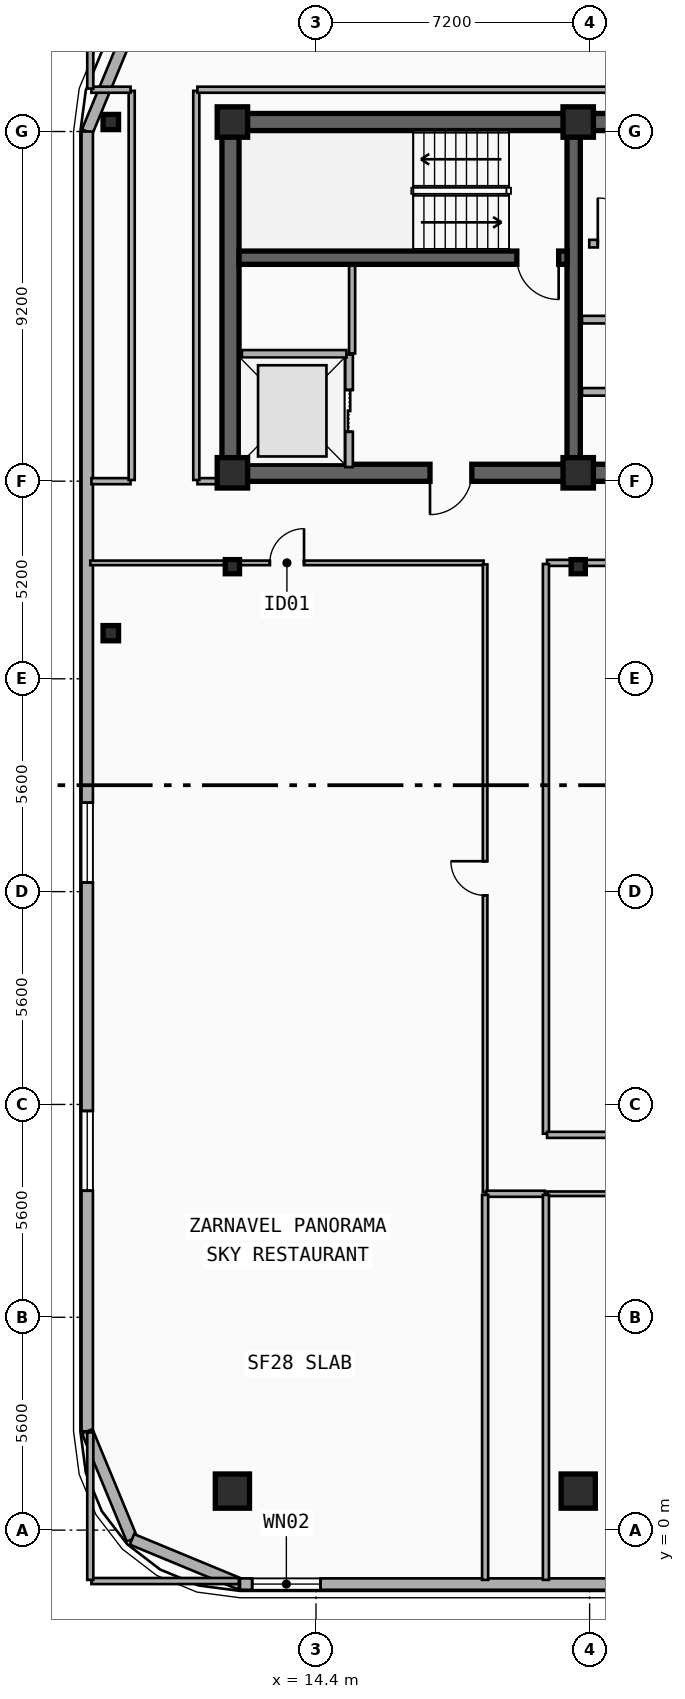
"""IFC4 building model, lengths in metres.
Left out: names, types, materials, properties, quantities, classifications, styles, units other than length and angle.
Written with IfcOpenShell. Run it as: python <this file> out.ifc"""

import sys

from ifc_helpers import new_model, si_unit, direction, frame, frame_2d, origin, origin_2d, place, context, subcontext, project, spatial, rectangle, i_section, extrude, element, fill, save


model = new_model("IFC4")
c1 = context("Model", 3, precision=1e-05, world=origin(), true_north=direction((0.0, 1.0)))
c2 = subcontext(c1, "Body", "Model", "MODEL_VIEW")
j1 = project(units=[si_unit("LENGTHUNIT", "METRE"), si_unit("PLANEANGLEUNIT", "RADIAN")], contexts=[c1])
p1 = place(None, origin())
s1 = spatial("IfcSite", under=j1, at=p1, CompositionType="ELEMENT")
p2 = place(p1, origin())
s2 = spatial("IfcBuilding", under=s1, at=p2, CompositionType="ELEMENT")
p3 = place(p2, frame((0.0, 0.0, 276.9)))
s3 = spatial("IfcBuildingStorey", under=s2, at=p3, CompositionType="ELEMENT", Elevation=276.9)
p4 = place(p3, frame((12.15, 37.05, 0.0), z_axis=(0.0, 0.0, 1.0), x_axis=(1.0, 0.0, 0.0)))
e1 = element("IfcWall", 1, at=p4, inside=s3, PredefinedType="SHEAR", context=c2, shape_type="SweptSolid", body=[
    extrude(rectangle(XDim=33.23, YDim=0.45, at=frame_2d((16.615, 0.0))), origin(), (0.0, 0.0, 1.0), 3.7),
])
p5 = place(p3, frame((21.18, 27.82, 0.0), z_axis=(0.0, 0.0, 1.0), x_axis=(-1.0, 0.0, 0.0)))
e2 = element("IfcWall", 2, at=p5, inside=s3, PredefinedType="SHEAR", context=c2, shape_type="SweptSolid", body=[
    extrude(rectangle(XDim=9.03, YDim=0.45, at=frame_2d((4.515, 0.0))), origin(), (0.0, 0.0, 1.0), 3.7),
])
p6 = place(p5, frame((2.68, 0.0, 0.0)))
e3 = element("IfcOpeningElement", 3, at=p6, cuts=e2, PredefinedType="OPENING", context=c2, shape_type="SweptSolid", body=[
    extrude(rectangle(XDim=1.1, YDim=2.15, at=frame_2d((0.55, 1.075))), frame((0.0, 0.235, 0.0), z_axis=(0.0, -1.0, 0.0), x_axis=(1.0, 0.0, 0.0)), (0.0, 0.0, 1.0), 0.47),
])
p7 = place(p3, frame((33.15, 27.82, 0.0), z_axis=(0.0, 0.0, 1.0), x_axis=(-1.0, 0.0, 0.0)))
e4 = element("IfcWall", 4, at=p7, inside=s3, PredefinedType="SHEAR", context=c2, shape_type="SweptSolid", body=[
    extrude(rectangle(XDim=11.97, YDim=0.45, at=frame_2d((5.985, 0.0))), origin(), (0.0, 0.0, 1.0), 3.7),
])
p8 = place(p7, frame((6.1, 0.0, 0.0)))
e5 = element("IfcOpeningElement", 5, at=p8, cuts=e4, PredefinedType="OPENING", context=c2, shape_type="SweptSolid", body=[
    extrude(rectangle(XDim=1.6, YDim=2.2, at=frame_2d((0.8, 1.1))), frame((0.0, 0.235, 0.0), z_axis=(0.0, -1.0, 0.0), x_axis=(1.0, 0.0, 0.0)), (0.0, 0.0, 1.0), 0.47),
])
p9 = place(p3, frame((12.15, 28.045, 0.0), z_axis=(0.0, 0.0, 1.0), x_axis=(0.0, 1.0, 0.0)))
e6 = element("IfcWall", 6, at=p9, inside=s3, PredefinedType="SHEAR", context=c2, shape_type="SweptSolid", body=[
    extrude(rectangle(XDim=8.78, YDim=0.45, at=frame_2d((4.39, 0.0))), origin(), (0.0, 0.0, 1.0), 3.7),
])
p10 = place(p3, frame((21.18, 28.045, 0.0), z_axis=(0.0, 0.0, 1.0), x_axis=(0.0, 1.0, 0.0)))
e7 = element("IfcWall", 7, at=p10, inside=s3, PredefinedType="SHEAR", context=c2, shape_type="SweptSolid", body=[
    extrude(rectangle(XDim=8.78, YDim=0.35, at=frame_2d((4.39, 0.0))), origin(), (0.0, 0.0, 1.0), 3.7),
])
p11 = place(p3, frame((21.005, 33.48, 0.0), z_axis=(0.0, 0.0, 1.0), x_axis=(-1.0, 0.0, 0.0)))
e8 = element("IfcWall", 8, at=p11, inside=s3, PredefinedType="SHEAR", context=c2, shape_type="SweptSolid", body=[
    extrude(rectangle(XDim=8.63, YDim=0.35, at=frame_2d((4.315, 0.0))), origin(), (0.0, 0.0, 1.0), 3.7),
])
p12 = place(p11, frame((0.22, 0.0, 0.0)))
e9 = element("IfcOpeningElement", 9, at=p12, cuts=e8, PredefinedType="OPENING", context=c2, shape_type="SweptSolid", body=[
    extrude(rectangle(XDim=1.1, YDim=2.15, at=frame_2d((0.55, 1.075))), frame((0.0, 0.185, 0.0), z_axis=(0.0, -1.0, 0.0), x_axis=(1.0, 0.0, 0.0)), (0.0, 0.0, 1.0), 0.37),
])
for number, where, z_axis, x_axis in (
    (10, (12.2, 27.82, 0.0), (0.0, 0.0, 1.0), (1.0, 0.0, 0.0)),
    (11, (12.2, 37.05, 0.0), (0.0, 0.0, 1.0), (1.0, 0.0, 0.0)),
    (12, (21.3, 27.82, 0.0), (0.0, 0.0, 1.0), (1.0, 0.0, 0.0)),
    (13, (21.3, 37.05, 0.0), (0.0, 0.0, 1.0), (1.0, 0.0, 0.0)),
):
    element("IfcColumn", number, at=place(p3, frame(where, z_axis=z_axis, x_axis=x_axis)), inside=s3, PredefinedType="COLUMN", context=c2, shape_type="SweptSolid", body=[
        extrude(rectangle(XDim=0.8, YDim=0.8, at=origin_2d()), origin(), (0.0, 0.0, 1.0), 3.7),
    ])
for number, where, z_axis, x_axis in (
    (14, (12.2, 25.35, 0.0), (0.0, 0.0, 1.0), (1.0, 0.0, 0.0)),
    (15, (21.3, 25.35, 0.0), (0.0, 0.0, 1.0), (1.0, 0.0, 0.0)),
):
    element("IfcColumn", number, at=place(p3, frame(where, z_axis=z_axis, x_axis=x_axis)), inside=s3, PredefinedType="COLUMN", context=c2, shape_type="SweptSolid", body=[
        extrude(i_section(OverallWidth=0.374, OverallDepth=0.372, WebThickness=0.017, FlangeThickness=0.027, FilletRadius=0.015, at=origin_2d()), origin(), (0.0, 0.0, 1.0), 3.7),
    ])
for number, where, z_axis, x_axis in (
    (16, (12.2, 1.135, 0.0), (0.0, -0.09, 0.996), (1.0, 0.0, 0.0)),
    (17, (21.3, 1.135, 0.0), (0.0, -0.09, 0.996), (1.0, 0.0, 0.0)),
):
    element("IfcColumn", number, at=place(p3, frame(where, z_axis=z_axis, x_axis=x_axis)), inside=s3, PredefinedType="COLUMN", context=c2, shape_type="SweptSolid", body=[
        extrude(rectangle(XDim=0.9, YDim=0.9, at=origin_2d()), origin(), (0.0, 0.0, 1.0), 3.715),
    ])
for number, where, z_axis, x_axis in (
    (18, (9.0, 23.6, 0.0), (0.0, 0.0, 1.0), (1.0, 0.0, 0.0)),
    (19, (9.0, 37.05, 0.0), (0.0, 0.0, 1.0), (1.0, 0.0, 0.0)),
):
    element("IfcColumn", number, at=place(p3, frame(where, z_axis=z_axis, x_axis=x_axis)), inside=s3, PredefinedType="COLUMN", context=c2, shape_type="SweptSolid", body=[
        extrude(i_section(OverallWidth=0.408, OverallDepth=0.4, WebThickness=0.025, FlangeThickness=0.039, FilletRadius=0.015, at=origin_2d()), origin(), (0.0, 0.0, 1.0), 3.7),
    ])
p13 = place(p3, frame((8.38, 36.8, 0.0), z_axis=(0.0, 0.0, 1.0), x_axis=(0.382704529509, 0.923870793506, 0.0)))
e20 = element("IfcWall", 20, at=p13, inside=s3, PredefinedType="SOLIDWALL", context=c2, shape_type="SweptSolid", body=[
    extrude(rectangle(XDim=3.077, YDim=0.3, at=frame_2d((1.538, 0.0))), origin(), (0.0, 0.0, 1.0), 3.38),
])
p14 = place(p3, frame((8.38, 2.6, 0.0), z_axis=(0.0, 0.0, 1.0), x_axis=(0.0, 1.0, 0.0)))
e21 = element("IfcWall", 21, at=p14, inside=s3, PredefinedType="SOLIDWALL", context=c2, shape_type="SweptSolid", body=[
    extrude(rectangle(XDim=34.2, YDim=0.3, at=frame_2d((17.1, 0.0))), origin(), (0.0, 0.0, 1.0), 3.38),
])
p15 = place(p14, frame((6.33, 0.0, 0.75)))
e22 = element("IfcOpeningElement", 22, at=p15, cuts=e21, PredefinedType="OPENING", context=c2, shape_type="SweptSolid", body=[
    extrude(rectangle(XDim=2.1, YDim=2.1, at=frame_2d((1.05, 1.05))), frame((0.0, 0.16, 0.0), z_axis=(0.0, -1.0, 0.0), x_axis=(1.0, 0.0, 0.0)), (0.0, 0.0, 1.0), 0.32),
])
p16 = place(p14, frame((14.44, 0.0, 0.75)))
e23 = element("IfcOpeningElement", 23, at=p16, cuts=e21, PredefinedType="OPENING", context=c2, shape_type="SweptSolid", body=[
    extrude(rectangle(XDim=2.1, YDim=2.1, at=frame_2d((1.05, 1.05))), frame((0.0, 0.16, 0.0), z_axis=(0.0, -1.0, 0.0), x_axis=(1.0, 0.0, 0.0)), (0.0, 0.0, 1.0), 0.32),
])
p17 = place(p3, frame((9.557, -0.243, 0.0), z_axis=(0.0, 0.0, 1.0), x_axis=(-0.382676475685, 0.923882414032, 0.0)))
e24 = element("IfcWall", 24, at=p17, inside=s3, PredefinedType="SOLIDWALL", context=c2, shape_type="SweptSolid", body=[
    extrude(rectangle(XDim=3.077, YDim=0.3, at=frame_2d((1.539, 0.0))), origin(), (0.0, 0.0, 1.0), 3.38),
])
p18 = place(p3, frame((12.4, -1.42, 0.0), z_axis=(0.0, 0.0, 1.0), x_axis=(-0.92389884758, 0.382636798336, 0.0)))
e25 = element("IfcWall", 25, at=p18, inside=s3, PredefinedType="SOLIDWALL", context=c2, shape_type="SweptSolid", body=[
    extrude(rectangle(XDim=3.077, YDim=0.3, at=frame_2d((1.538, 0.0))), origin(), (0.0, 0.0, 1.0), 3.38),
])
p19 = place(p3, frame((45.2, -1.42, 0.0), z_axis=(0.0, 0.0, 1.0), x_axis=(-1.0, 0.0, 0.0)))
e26 = element("IfcWall", 26, at=p19, inside=s3, PredefinedType="SOLIDWALL", context=c2, shape_type="SweptSolid", body=[
    extrude(rectangle(XDim=32.8, YDim=0.3, at=frame_2d((16.4, 0.0))), origin(), (0.0, 0.0, 1.0), 3.38),
])
p20 = place(p19, frame((30.68, 0.0, 0.34)))
e27 = element("IfcOpeningElement", 27, at=p20, cuts=e26, PredefinedType="OPENING", context=c2, shape_type="SweptSolid", body=[
    extrude(rectangle(XDim=1.8, YDim=1.8, at=frame_2d((0.9, 0.9))), frame((0.0, 0.16, 0.0), z_axis=(0.0, -1.0, 0.0), x_axis=(1.0, 0.0, 0.0)), (0.0, 0.0, 1.0), 0.32),
])
p21 = place(p19, frame((10.206, 0.0, 0.75)))
e28 = element("IfcOpeningElement", 28, at=p21, cuts=e26, PredefinedType="OPENING", context=c2, shape_type="SweptSolid", body=[
    extrude(rectangle(XDim=2.1, YDim=2.1, at=frame_2d((1.05, 1.05))), frame((0.0, 0.16, 0.0), z_axis=(0.0, -1.0, 0.0), x_axis=(1.0, 0.0, 0.0)), (0.0, 0.0, 1.0), 0.32),
])
p22 = place(p3, frame((15.27, 27.97, 0.0), z_axis=(0.0, 0.0, 1.0), x_axis=(0.0, 1.0, 0.0)))
e29 = element("IfcWall", 29, at=p22, inside=s3, PredefinedType="PARTITIONING", context=c2, shape_type="SweptSolid", body=[
    extrude(rectangle(XDim=2.96, YDim=0.2, at=frame_2d((1.48, 0.0))), origin(), (0.0, 0.0, 1.0), 2.45),
])
p23 = place(p22, frame((0.93, 0.0, 0.0)))
e30 = element("IfcOpeningElement", 30, at=p23, cuts=e29, PredefinedType="OPENING", context=c2, shape_type="SweptSolid", body=[
    extrude(rectangle(XDim=1.1, YDim=2.15, at=frame_2d((0.55, 1.075))), frame((0.0, 0.11, 0.0), z_axis=(0.0, -1.0, 0.0), x_axis=(1.0, 0.0, 0.0)), (0.0, 0.0, 1.0), 0.22),
])
p24 = place(p3, frame((12.45, 30.95, 0.0), z_axis=(0.0, 0.0, 1.0), x_axis=(1.0, 0.0, 0.0)))
e31 = element("IfcWall", 31, at=p24, inside=s3, PredefinedType="PARTITIONING", context=c2, shape_type="SweptSolid", body=[
    extrude(rectangle(XDim=2.75, YDim=0.2, at=frame_2d((1.375, 0.0))), origin(), (0.0, 0.0, 1.0), 2.45),
])
p25 = place(p3, frame((21.4, 31.85, 0.0), z_axis=(0.0, 0.0, 1.0), x_axis=(1.0, 0.0, 0.0)))
e32 = element("IfcWall", 32, at=p25, inside=s3, PredefinedType="PARTITIONING", context=c2, shape_type="SweptSolid", body=[
    extrude(rectangle(XDim=3.66, YDim=0.2, at=frame_2d((1.83, 0.0))), origin(), (0.0, 0.0, 1.0), 2.45),
])
p26 = place(p25, frame((1.23, 0.0, 0.0)))
e33 = element("IfcOpeningElement", 33, at=p26, cuts=e32, PredefinedType="OPENING", context=c2, shape_type="SweptSolid", body=[
    extrude(rectangle(XDim=1.2, YDim=2.15, at=frame_2d((0.6, 1.075))), frame((0.0, 0.11, 0.0), z_axis=(0.0, -1.0, 0.0), x_axis=(1.0, 0.0, 0.0)), (0.0, 0.0, 1.0), 0.22),
])
p27 = place(p3, frame((21.59, 33.85, 0.0), z_axis=(0.0, 0.0, 1.0), x_axis=(1.0, 0.0, 0.0)))
e34 = element("IfcWall", 34, at=p27, inside=s3, PredefinedType="PARTITIONING", context=c2, shape_type="SweptSolid", body=[
    extrude(rectangle(XDim=3.52, YDim=0.2, at=frame_2d((1.76, 0.0))), origin(), (0.0, 0.0, 1.0), 2.45),
])
p28 = place(p27, frame((0.225, 0.0, 0.0)))
e35 = element("IfcOpeningElement", 35, at=p28, cuts=e34, PredefinedType="OPENING", context=c2, shape_type="SweptSolid", body=[
    extrude(rectangle(XDim=1.2, YDim=2.15, at=frame_2d((0.6, 1.075))), frame((0.0, 0.11, 0.0), z_axis=(0.0, -1.0, 0.0), x_axis=(1.0, 0.0, 0.0)), (0.0, 0.0, 1.0), 0.22),
])
p29 = place(p3, frame((21.4, 29.95, 0.0), z_axis=(0.0, 0.0, 1.0), x_axis=(1.0, 0.0, 0.0)))
e36 = element("IfcWall", 36, at=p29, inside=s3, PredefinedType="PARTITIONING", context=c2, shape_type="SweptSolid", body=[
    extrude(rectangle(XDim=3.66, YDim=0.2, at=frame_2d((1.83, 0.0))), origin(), (0.0, 0.0, 1.0), 2.45),
])
p30 = place(p3, frame((8.46, 25.45, 0.0), z_axis=(0.0, 0.0, 1.0), x_axis=(1.0, 0.0, 0.0)))
e37 = element("IfcWall", 37, at=p30, inside=s3, PredefinedType="PARTITIONING", context=c2, shape_type="SweptSolid", body=[
    extrude(rectangle(XDim=10.35, YDim=0.12, at=frame_2d((5.175, 0.0))), origin(), (0.0, 0.0, 1.0), 2.66),
])
p31 = place(p30, frame((4.725, 0.0, 0.0)))
e38 = element("IfcOpeningElement", 38, at=p31, cuts=e37, PredefinedType="OPENING", context=c2, shape_type="SweptSolid", body=[
    extrude(rectangle(XDim=0.9, YDim=2.1, at=frame_2d((0.45, 1.05))), frame((0.0, 0.07, 0.0), z_axis=(0.0, -1.0, 0.0), x_axis=(1.0, 0.0, 0.0)), (0.0, 0.0, 1.0), 0.14),
])
p32 = place(p3, frame((18.85, 8.89, 0.0), z_axis=(0.0, 0.0, 1.0), x_axis=(0.0, 1.0, 0.0)))
e39 = element("IfcWall", 39, at=p32, inside=s3, PredefinedType="PARTITIONING", context=c2, shape_type="SweptSolid", body=[
    extrude(rectangle(XDim=16.52, YDim=0.12, at=frame_2d((8.26, 0.0))), origin(), (0.0, 0.0, 1.0), 2.86),
])
p33 = place(p32, frame((7.81, 0.0, 0.0)))
e40 = element("IfcOpeningElement", 40, at=p33, cuts=e39, PredefinedType="OPENING", context=c2, shape_type="SweptSolid", body=[
    extrude(rectangle(XDim=0.9, YDim=2.1, at=frame_2d((0.45, 1.05))), frame((0.0, 0.07, 0.0), z_axis=(0.0, -1.0, 0.0), x_axis=(1.0, 0.0, 0.0)), (0.0, 0.0, 1.0), 0.14),
])
p34 = place(p3, frame((20.49, 8.85, 0.0), z_axis=(0.0, 0.0, 1.0), x_axis=(1.0, 0.0, 0.0)))
e41 = element("IfcWall", 41, at=p34, inside=s3, PredefinedType="PARTITIONING", context=c2, shape_type="SweptSolid", body=[
    extrude(rectangle(XDim=15.82, YDim=0.12, at=frame_2d((7.91, 0.0))), origin(), (0.0, 0.0, 1.0), 2.66),
])
p35 = place(p34, frame((7.46, 0.0, 0.0)))
e42 = element("IfcOpeningElement", 42, at=p35, cuts=e41, PredefinedType="OPENING", context=c2, shape_type="SweptSolid", body=[
    extrude(rectangle(XDim=0.9, YDim=2.1, at=frame_2d((0.45, 1.05))), frame((0.0, 0.07, 0.0), z_axis=(0.0, -1.0, 0.0), x_axis=(1.0, 0.0, 0.0)), (0.0, 0.0, 1.0), 0.14),
])
p36 = place(p3, frame((15.35, 30.96, 0.0), z_axis=(0.0, 0.0, 1.0), x_axis=(0.0, 1.0, 0.0)))
e43 = element("IfcWall", 43, at=p36, inside=s3, PredefinedType="PARTITIONING", context=c2, shape_type="SweptSolid", body=[
    extrude(rectangle(XDim=2.31, YDim=0.16, at=frame_2d((1.155, 0.0))), origin(), (0.0, 0.0, 1.0), 3.38),
])
p37 = place(p3, frame((20.48, 25.45, 0.0), z_axis=(0.0, 0.0, 1.0), x_axis=(1.0, 0.0, 0.0)))
e44 = element("IfcWall", 44, at=p37, inside=s3, PredefinedType="PARTITIONING", context=c2, shape_type="SweptSolid", body=[
    extrude(rectangle(XDim=15.84, YDim=0.16, at=frame_2d((7.92, 0.0))), origin(), (0.0, 0.0, 1.0), 2.66),
])
p38 = place(p3, frame((8.49, 27.6, 0.0), z_axis=(0.0, 0.0, 1.0), x_axis=(1.0, 0.0, 0.0)))
e45 = element("IfcWall", 45, at=p38, inside=s3, PredefinedType="PARTITIONING", context=c2, shape_type="SweptSolid", body=[
    extrude(rectangle(XDim=1.03, YDim=0.16, at=frame_2d((0.515, 0.0))), origin(), (0.0, 0.0, 1.0), 3.38),
])
p39 = place(p3, frame((11.28, 27.6, 0.0), z_axis=(0.0, 0.0, 1.0), x_axis=(1.0, 0.0, 0.0)))
e46 = element("IfcWall", 46, at=p39, inside=s3, PredefinedType="PARTITIONING", context=c2, shape_type="SweptSolid", body=[
    extrude(rectangle(XDim=0.84, YDim=0.16, at=frame_2d((0.42, 0.0))), origin(), (0.0, 0.0, 1.0), 2.45),
])
p40 = place(p3, frame((18.88, 8.85, 0.0), z_axis=(0.0, 0.0, 1.0), x_axis=(1.0, 0.0, 0.0)))
e47 = element("IfcWall", 47, at=p40, inside=s3, PredefinedType="PARTITIONING", context=c2, shape_type="SweptSolid", body=[
    extrude(rectangle(XDim=1.54, YDim=0.16, at=frame_2d((0.77, 0.0))), origin(), (0.0, 0.0, 1.0), 3.38),
])
p41 = place(p3, frame((20.45, 10.43, 0.0), z_axis=(0.0, 0.0, 1.0), x_axis=(0.0, 1.0, 0.0)))
e48 = element("IfcWall", 48, at=p41, inside=s3, PredefinedType="PARTITIONING", context=c2, shape_type="SweptSolid", body=[
    extrude(rectangle(XDim=14.99, YDim=0.16, at=frame_2d((7.495, 0.0))), origin(), (0.0, 0.0, 1.0), 2.86),
])
p42 = place(p3, frame((20.48, 10.4, 0.0), z_axis=(0.0, 0.0, 1.0), x_axis=(1.0, 0.0, 0.0)))
e49 = element("IfcWall", 49, at=p42, inside=s3, PredefinedType="PARTITIONING", context=c2, shape_type="SweptSolid", body=[
    extrude(rectangle(XDim=2.64, YDim=0.16, at=frame_2d((1.32, 0.0))), origin(), (0.0, 0.0, 1.0), 2.66),
])
for number, where, z_axis, x_axis in (
    (50, (9.55, 27.63, 0.0), (0.0, 0.0, 1.0), (0.0, 1.0, 0.0)),
    (51, (11.25, 27.63, 0.0), (0.0, 0.0, 1.0), (0.0, 1.0, 0.0)),
):
    element("IfcWall", number, at=place(p3, frame(where, z_axis=z_axis, x_axis=x_axis)), inside=s3, PredefinedType="PARTITIONING", context=c2, shape_type="SweptSolid", body=[
        extrude(rectangle(XDim=10.24, YDim=0.16, at=frame_2d((5.12, 0.0))), origin(), (0.0, 0.0, 1.0), 2.86),
    ])
p43 = place(p3, frame((8.49, 37.9, 0.0), z_axis=(0.0, 0.0, 1.0), x_axis=(1.0, 0.0, 0.0)))
e52 = element("IfcWall", 52, at=p43, inside=s3, PredefinedType="PARTITIONING", context=c2, shape_type="SweptSolid", body=[
    extrude(rectangle(XDim=1.03, YDim=0.16, at=frame_2d((0.515, 0.0))), origin(), (0.0, 0.0, 1.0), 3.38),
])
p44 = place(p3, frame((11.28, 37.9, 0.0), z_axis=(0.0, 0.0, 1.0), x_axis=(1.0, 0.0, 0.0)))
e53 = element("IfcWall", 53, at=p44, inside=s3, PredefinedType="PARTITIONING", context=c2, shape_type="SweptSolid", body=[
    extrude(rectangle(XDim=35.04, YDim=0.16, at=frame_2d((17.52, 0.0))), origin(), (0.0, 0.0, 1.0), 3.38),
])
p45 = place(p3, frame((8.46, 37.93, 0.0), z_axis=(0.0, 0.0, 1.0), x_axis=(0.0, 1.0, 0.0)))
e54 = element("IfcWall", 54, at=p45, inside=s3, PredefinedType="PARTITIONING", context=c2, shape_type="SweptSolid", body=[
    extrude(rectangle(XDim=1.44, YDim=0.16, at=frame_2d((0.72, 0.0))), origin(), (0.0, 0.0, 1.0), 3.38),
])
for number, where, z_axis, x_axis in (
    (55, (8.49, -1.34, 0.0), (0.0, 0.0, 1.0), (1.0, 0.0, 0.0)),
    (56, (8.46, -1.31, 0.0), (0.0, 0.0, 1.0), (0.0, 1.0, 0.0)),
):
    element("IfcWall", number, at=place(p3, frame(where, z_axis=z_axis, x_axis=x_axis)), inside=s3, PredefinedType="PARTITIONING", context=c2, shape_type="SweptSolid", body=[
        extrude(rectangle(XDim=3.88, YDim=0.16, at=frame_2d((1.94, 0.0))), origin(), (0.0, 0.0, 1.0), 3.38),
    ])
for number, where, z_axis, x_axis in (
    (57, (18.85, -1.31, 0.0), (0.0, 0.0, 1.0), (0.0, 1.0, 0.0)),
    (58, (20.45, -1.31, 0.0), (0.0, 0.0, 1.0), (0.0, 1.0, 0.0)),
):
    element("IfcWall", number, at=place(p3, frame(where, z_axis=z_axis, x_axis=x_axis)), inside=s3, PredefinedType="PARTITIONING", context=c2, shape_type="SweptSolid", body=[
        extrude(rectangle(XDim=10.13, YDim=0.16, at=frame_2d((5.065, 0.0))), origin(), (0.0, 0.0, 1.0), 3.01),
    ])
p46 = place(p15, origin())
e59 = element("IfcWindow", 59, at=p46, inside=s3, PartitioningType="SINGLE_PANEL", PredefinedType="WINDOW", context=c2, shape_type="SweptSolid", body=[
    extrude(rectangle(XDim=2.1, YDim=2.1, at=frame_2d((1.05, 1.05))), frame((0.0, 0.03, 0.0), z_axis=(0.0, -1.0, 0.0), x_axis=(1.0, 0.0, 0.0)), (0.0, 0.0, 1.0), 0.06),
])
fill(e22, e59)
p47 = place(p16, origin())
e60 = element("IfcWindow", 60, at=p47, inside=s3, PartitioningType="SINGLE_PANEL", PredefinedType="WINDOW", context=c2, shape_type="SweptSolid", body=[
    extrude(rectangle(XDim=2.1, YDim=2.1, at=frame_2d((1.05, 1.05))), frame((0.0, 0.03, 0.0), z_axis=(0.0, -1.0, 0.0), x_axis=(1.0, 0.0, 0.0)), (0.0, 0.0, 1.0), 0.06),
])
fill(e23, e60)
p48 = place(p20, origin())
e61 = element("IfcWindow", 61, at=p48, inside=s3, PartitioningType="SINGLE_PANEL", PredefinedType="WINDOW", context=c2, shape_type="SweptSolid", body=[
    extrude(rectangle(XDim=1.8, YDim=1.8, at=frame_2d((0.9, 0.9))), frame((0.0, 0.03, 0.0), z_axis=(0.0, -1.0, 0.0), x_axis=(1.0, 0.0, 0.0)), (0.0, 0.0, 1.0), 0.06),
])
fill(e27, e61)
p49 = place(p23, origin())
e62 = element("IfcDoor", 62, at=p49, inside=s3, OperationType="DOUBLE_DOOR_SLIDING", PredefinedType="DOOR", context=c2, shape_type="SweptSolid", body=[
    extrude(rectangle(XDim=1.1, YDim=2.15, at=frame_2d((0.55, 1.075))), frame((0.0, 0.025, 0.0), z_axis=(0.0, -1.0, 0.0), x_axis=(1.0, 0.0, 0.0)), (0.0, 0.0, 1.0), 0.05),
])
fill(e30, e62)
p50 = place(p12, origin())
e63 = element("IfcDoor", 63, at=p50, inside=s3, OperationType="SINGLE_SWING_LEFT", PredefinedType="DOOR", context=c2, shape_type="SweptSolid", body=[
    extrude(rectangle(XDim=1.1, YDim=2.15, at=frame_2d((0.55, 1.075))), frame((0.0, 0.025, 0.0), z_axis=(0.0, -1.0, 0.0), x_axis=(1.0, 0.0, 0.0)), (0.0, 0.0, 1.0), 0.05),
])
fill(e9, e63)
p51 = place(p6, origin())
e64 = element("IfcDoor", 64, at=p51, inside=s3, OperationType="SINGLE_SWING_RIGHT", PredefinedType="DOOR", context=c2, shape_type="SweptSolid", body=[
    extrude(rectangle(XDim=1.1, YDim=2.15, at=frame_2d((0.55, 1.075))), frame((0.0, 0.025, 0.0), z_axis=(0.0, -1.0, 0.0), x_axis=(1.0, 0.0, 0.0)), (0.0, 0.0, 1.0), 0.05),
])
fill(e3, e64)
p52 = place(p28, origin())
e65 = element("IfcDoor", 65, at=p52, inside=s3, OperationType="SINGLE_SWING_LEFT", PredefinedType="DOOR", context=c2, shape_type="SweptSolid", body=[
    extrude(rectangle(XDim=1.2, YDim=2.15, at=frame_2d((0.6, 1.075))), frame((0.0, 0.025, 0.0), z_axis=(0.0, -1.0, 0.0), x_axis=(1.0, 0.0, 0.0)), (0.0, 0.0, 1.0), 0.05),
])
fill(e35, e65)
p53 = place(p31, origin())
e66 = element("IfcDoor", 66, at=p53, inside=s3, OperationType="SINGLE_SWING_RIGHT", PredefinedType="DOOR", context=c2, shape_type="SweptSolid", body=[
    extrude(rectangle(XDim=0.9, YDim=2.1, at=frame_2d((0.45, 1.05))), frame((0.0, 0.025, 0.0), z_axis=(0.0, -1.0, 0.0), x_axis=(1.0, 0.0, 0.0)), (0.0, 0.0, 1.0), 0.05),
])
fill(e38, e66)
p54 = place(p33, origin())
e67 = element("IfcDoor", 67, at=p54, inside=s3, OperationType="SINGLE_SWING_RIGHT", PredefinedType="DOOR", context=c2, shape_type="SweptSolid", body=[
    extrude(rectangle(XDim=0.9, YDim=2.1, at=frame_2d((0.45, 1.05))), frame((0.0, 0.025, 0.0), z_axis=(0.0, -1.0, 0.0), x_axis=(1.0, 0.0, 0.0)), (0.0, 0.0, 1.0), 0.05),
])
fill(e40, e67)
save(model, sys.argv[1])
